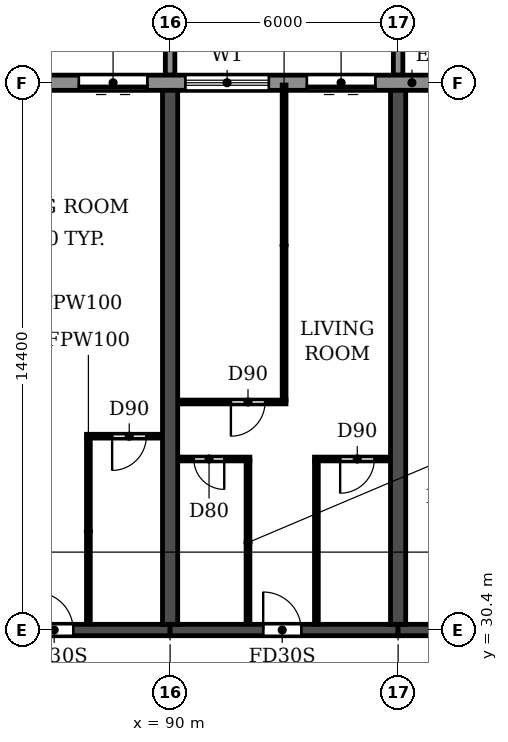
"""IFC4 building model, lengths in metres.
Left out: names, types, materials, properties, quantities, classifications, styles, units other than length and angle.
Written with IfcOpenShell. Run it as: python <this file> out.ifc"""

import sys

from ifc_helpers import new_model, si_unit, direction, frame, frame_2d, origin, place, context, subcontext, project, spatial, polyline, rectangle, outline, extrude, source, transform, mapped, element, fill, save


model = new_model("IFC4")
c1 = context("Model", 3, precision=1e-05, world=origin(), true_north=direction((0.0, 1.0)))
c2 = subcontext(c1, "Body", "Model", "MODEL_VIEW")
j1 = project(units=[si_unit("LENGTHUNIT", "METRE"), si_unit("PLANEANGLEUNIT", "RADIAN")], contexts=[c1])
p1 = place(None, origin())
s1 = spatial("IfcSite", under=j1, at=p1, CompositionType="ELEMENT")
p2 = place(p1, origin())
s2 = spatial("IfcBuilding", under=s1, at=p2, CompositionType="ELEMENT")
p3 = place(p2, frame((0.0, 0.0, 49.8)))
s3 = spatial("IfcBuildingStorey", under=s2, at=p3, CompositionType="ELEMENT", Elevation=49.8)
for number, where, z_axis, x_axis in (
    (1, (90.0, 30.55, 0.0), (0.0, 0.0, 1.0), (0.0, 1.0, 0.0)),
    (2, (96.0, 30.55, 0.0), (0.0, 0.0, 1.0), (0.0, 1.0, 0.0)),
):
    element("IfcWall", number, at=place(p3, frame(where, z_axis=z_axis, x_axis=x_axis)), inside=s3, PredefinedType="SHEAR", context=c2, shape_type="SweptSolid", body=[
        extrude(rectangle(XDim=14.05, YDim=0.4, at=frame_2d((7.025, 0.0))), origin(), (0.0, 0.0, 1.0), 3.0),
    ])
p4 = place(p3, frame((84.0, 30.4, 0.0), z_axis=(0.0, 0.0, 1.0), x_axis=(1.0, 0.0, 0.0)))
e3 = element("IfcWall", 3, at=p4, inside=s3, PredefinedType="SHEAR", context=c2, shape_type="SweptSolid", body=[
    extrude(rectangle(XDim=6.0, YDim=0.3, at=frame_2d((3.0, 0.0))), origin(), (0.0, 0.0, 1.0), 2.4),
])
p5 = place(p4, frame((2.45, 0.0, 0.0)))
e4 = element("IfcOpeningElement", 4, at=p5, cuts=e3, PredefinedType="OPENING", context=c2, shape_type="SweptSolid", body=[
    extrude(rectangle(XDim=1.0, YDim=2.1, at=frame_2d((0.5, 1.05))), frame((0.0, 0.16, 0.0), z_axis=(0.0, -1.0, 0.0), x_axis=(1.0, 0.0, 0.0)), (0.0, 0.0, 1.0), 0.32),
])
p6 = place(p3, frame((90.0, 30.4, 0.0), z_axis=(0.0, 0.0, 1.0), x_axis=(1.0, 0.0, 0.0)))
e5 = element("IfcWall", 5, at=p6, inside=s3, PredefinedType="SHEAR", context=c2, shape_type="SweptSolid", body=[
    extrude(rectangle(XDim=6.0, YDim=0.3, at=frame_2d((3.0, 0.0))), origin(), (0.0, 0.0, 1.0), 2.4),
])
p7 = place(p6, frame((2.45, 0.0, 0.0)))
e6 = element("IfcOpeningElement", 6, at=p7, cuts=e5, PredefinedType="OPENING", context=c2, shape_type="SweptSolid", body=[
    extrude(rectangle(XDim=1.0, YDim=2.1, at=frame_2d((0.5, 1.05))), frame((0.0, 0.16, 0.0), z_axis=(0.0, -1.0, 0.0), x_axis=(1.0, 0.0, 0.0)), (0.0, 0.0, 1.0), 0.32),
])
p8 = place(p3, frame((96.0, 30.4, 0.0), z_axis=(0.0, 0.0, 1.0), x_axis=(1.0, 0.0, 0.0)))
e7 = element("IfcWall", 7, at=p8, inside=s3, PredefinedType="SHEAR", context=c2, shape_type="SweptSolid", body=[
    extrude(rectangle(XDim=5.8, YDim=0.3, at=frame_2d((2.9, 0.0))), origin(), (0.0, 0.0, 1.0), 2.4),
])
p9 = place(p8, frame((2.5, 0.0, 0.0)))
e8 = element("IfcOpeningElement", 8, at=p9, cuts=e7, PredefinedType="OPENING", context=c2, shape_type="SweptSolid", body=[
    extrude(rectangle(XDim=1.0, YDim=2.1, at=frame_2d((0.5, 1.05))), frame((0.0, 0.16, 0.0), z_axis=(0.0, -1.0, 0.0), x_axis=(1.0, 0.0, 0.0)), (0.0, 0.0, 1.0), 0.32),
])
p10 = place(p3, frame((97.317, 44.8, 0.0), z_axis=(0.0, 0.0, 1.0), x_axis=(-1.0, 0.0, 0.0)))
e9 = element("IfcWall", 9, at=p10, inside=s3, PredefinedType="STANDARD", context=c2, shape_type="SweptSolid", body=[
    extrude(rectangle(XDim=92.634, YDim=0.4, at=frame_2d((46.317, 0.0))), origin(), (0.0, 0.0, 1.0), 3.0),
])
p11 = place(p10, frame((88.917, 0.0, 0.0)))
e10 = element("IfcOpeningElement", 10, at=p11, cuts=e9, PredefinedType="OPENING", context=c2, shape_type="SweptSolid", body=[
    extrude(rectangle(XDim=1.8, YDim=2.4, at=frame_2d((0.9, 1.2))), frame((0.0, 0.21, 0.0), z_axis=(0.0, -1.0, 0.0), x_axis=(1.0, 0.0, 0.0)), (0.0, 0.0, 1.0), 0.42),
])
p12 = place(p10, frame((85.717, 0.0, 0.9)))
e11 = element("IfcOpeningElement", 11, at=p12, cuts=e9, PredefinedType="OPENING", context=c2, shape_type="SweptSolid", body=[
    extrude(rectangle(XDim=2.2, YDim=1.5, at=frame_2d((1.1, 0.75))), frame((0.0, 0.21, 0.0), z_axis=(0.0, -1.0, 0.0), x_axis=(1.0, 0.0, 0.0)), (0.0, 0.0, 1.0), 0.42),
])
p13 = place(p10, frame((82.717, 0.0, 0.9)))
e12 = element("IfcOpeningElement", 12, at=p13, cuts=e9, PredefinedType="OPENING", context=c2, shape_type="SweptSolid", body=[
    extrude(rectangle(XDim=2.2, YDim=1.5, at=frame_2d((1.1, 0.75))), frame((0.0, 0.21, 0.0), z_axis=(0.0, -1.0, 0.0), x_axis=(1.0, 0.0, 0.0)), (0.0, 0.0, 1.0), 0.42),
])
p14 = place(p10, frame((79.717, 0.0, 0.9)))
e13 = element("IfcOpeningElement", 13, at=p14, cuts=e9, PredefinedType="OPENING", context=c2, shape_type="SweptSolid", body=[
    extrude(rectangle(XDim=2.2, YDim=1.5, at=frame_2d((1.1, 0.75))), frame((0.0, 0.21, 0.0), z_axis=(0.0, -1.0, 0.0), x_axis=(1.0, 0.0, 0.0)), (0.0, 0.0, 1.0), 0.42),
])
p15 = place(p10, frame((76.717, 0.0, 0.9)))
e14 = element("IfcOpeningElement", 14, at=p15, cuts=e9, PredefinedType="OPENING", context=c2, shape_type="SweptSolid", body=[
    extrude(rectangle(XDim=2.2, YDim=1.5, at=frame_2d((1.1, 0.75))), frame((0.0, 0.21, 0.0), z_axis=(0.0, -1.0, 0.0), x_axis=(1.0, 0.0, 0.0)), (0.0, 0.0, 1.0), 0.42),
])
p16 = place(p10, frame((73.917, 0.0, 0.0)))
e15 = element("IfcOpeningElement", 15, at=p16, cuts=e9, PredefinedType="OPENING", context=c2, shape_type="SweptSolid", body=[
    extrude(rectangle(XDim=1.8, YDim=2.4, at=frame_2d((0.9, 1.2))), frame((0.0, 0.21, 0.0), z_axis=(0.0, -1.0, 0.0), x_axis=(1.0, 0.0, 0.0)), (0.0, 0.0, 1.0), 0.42),
])
p17 = place(p10, frame((70.717, 0.0, 0.9)))
e16 = element("IfcOpeningElement", 16, at=p17, cuts=e9, PredefinedType="OPENING", context=c2, shape_type="SweptSolid", body=[
    extrude(rectangle(XDim=2.2, YDim=1.5, at=frame_2d((1.1, 0.75))), frame((0.0, 0.21, 0.0), z_axis=(0.0, -1.0, 0.0), x_axis=(1.0, 0.0, 0.0)), (0.0, 0.0, 1.0), 0.42),
])
p18 = place(p10, frame((67.717, 0.0, 0.9)))
e17 = element("IfcOpeningElement", 17, at=p18, cuts=e9, PredefinedType="OPENING", context=c2, shape_type="SweptSolid", body=[
    extrude(rectangle(XDim=2.2, YDim=1.5, at=frame_2d((1.1, 0.75))), frame((0.0, 0.21, 0.0), z_axis=(0.0, -1.0, 0.0), x_axis=(1.0, 0.0, 0.0)), (0.0, 0.0, 1.0), 0.42),
])
p19 = place(p10, frame((64.717, 0.0, 0.9)))
e18 = element("IfcOpeningElement", 18, at=p19, cuts=e9, PredefinedType="OPENING", context=c2, shape_type="SweptSolid", body=[
    extrude(rectangle(XDim=2.2, YDim=1.5, at=frame_2d((1.1, 0.75))), frame((0.0, 0.21, 0.0), z_axis=(0.0, -1.0, 0.0), x_axis=(1.0, 0.0, 0.0)), (0.0, 0.0, 1.0), 0.42),
])
p20 = place(p10, frame((61.917, 0.0, 0.0)))
e19 = element("IfcOpeningElement", 19, at=p20, cuts=e9, PredefinedType="OPENING", context=c2, shape_type="SweptSolid", body=[
    extrude(rectangle(XDim=1.8, YDim=2.4, at=frame_2d((0.9, 1.2))), frame((0.0, 0.21, 0.0), z_axis=(0.0, -1.0, 0.0), x_axis=(1.0, 0.0, 0.0)), (0.0, 0.0, 1.0), 0.42),
])
p21 = place(p10, frame((58.717, 0.0, 0.9)))
e20 = element("IfcOpeningElement", 20, at=p21, cuts=e9, PredefinedType="OPENING", context=c2, shape_type="SweptSolid", body=[
    extrude(rectangle(XDim=2.2, YDim=1.5, at=frame_2d((1.1, 0.75))), frame((0.0, 0.21, 0.0), z_axis=(0.0, -1.0, 0.0), x_axis=(1.0, 0.0, 0.0)), (0.0, 0.0, 1.0), 0.42),
])
p22 = place(p10, frame((55.717, 0.0, 0.9)))
e21 = element("IfcOpeningElement", 21, at=p22, cuts=e9, PredefinedType="OPENING", context=c2, shape_type="SweptSolid", body=[
    extrude(rectangle(XDim=2.2, YDim=1.5, at=frame_2d((1.1, 0.75))), frame((0.0, 0.21, 0.0), z_axis=(0.0, -1.0, 0.0), x_axis=(1.0, 0.0, 0.0)), (0.0, 0.0, 1.0), 0.42),
])
p23 = place(p10, frame((52.717, 0.0, 0.9)))
e22 = element("IfcOpeningElement", 22, at=p23, cuts=e9, PredefinedType="OPENING", context=c2, shape_type="SweptSolid", body=[
    extrude(rectangle(XDim=2.2, YDim=1.5, at=frame_2d((1.1, 0.75))), frame((0.0, 0.21, 0.0), z_axis=(0.0, -1.0, 0.0), x_axis=(1.0, 0.0, 0.0)), (0.0, 0.0, 1.0), 0.42),
])
p24 = place(p10, frame((49.917, 0.0, 0.0)))
e23 = element("IfcOpeningElement", 23, at=p24, cuts=e9, PredefinedType="OPENING", context=c2, shape_type="SweptSolid", body=[
    extrude(rectangle(XDim=1.8, YDim=2.4, at=frame_2d((0.9, 1.2))), frame((0.0, 0.21, 0.0), z_axis=(0.0, -1.0, 0.0), x_axis=(1.0, 0.0, 0.0)), (0.0, 0.0, 1.0), 0.42),
])
p25 = place(p10, frame((46.717, 0.0, 0.9)))
e24 = element("IfcOpeningElement", 24, at=p25, cuts=e9, PredefinedType="OPENING", context=c2, shape_type="SweptSolid", body=[
    extrude(rectangle(XDim=2.2, YDim=1.5, at=frame_2d((1.1, 0.75))), frame((0.0, 0.21, 0.0), z_axis=(0.0, -1.0, 0.0), x_axis=(1.0, 0.0, 0.0)), (0.0, 0.0, 1.0), 0.42),
])
p26 = place(p10, frame((43.717, 0.0, 0.9)))
e25 = element("IfcOpeningElement", 25, at=p26, cuts=e9, PredefinedType="OPENING", context=c2, shape_type="SweptSolid", body=[
    extrude(rectangle(XDim=2.2, YDim=1.5, at=frame_2d((1.1, 0.75))), frame((0.0, 0.21, 0.0), z_axis=(0.0, -1.0, 0.0), x_axis=(1.0, 0.0, 0.0)), (0.0, 0.0, 1.0), 0.42),
])
p27 = place(p10, frame((40.717, 0.0, 0.9)))
e26 = element("IfcOpeningElement", 26, at=p27, cuts=e9, PredefinedType="OPENING", context=c2, shape_type="SweptSolid", body=[
    extrude(rectangle(XDim=2.2, YDim=1.5, at=frame_2d((1.1, 0.75))), frame((0.0, 0.21, 0.0), z_axis=(0.0, -1.0, 0.0), x_axis=(1.0, 0.0, 0.0)), (0.0, 0.0, 1.0), 0.42),
])
p28 = place(p10, frame((37.917, 0.0, 0.0)))
e27 = element("IfcOpeningElement", 27, at=p28, cuts=e9, PredefinedType="OPENING", context=c2, shape_type="SweptSolid", body=[
    extrude(rectangle(XDim=1.8, YDim=2.4, at=frame_2d((0.9, 1.2))), frame((0.0, 0.21, 0.0), z_axis=(0.0, -1.0, 0.0), x_axis=(1.0, 0.0, 0.0)), (0.0, 0.0, 1.0), 0.42),
])
p29 = place(p10, frame((34.717, 0.0, 0.9)))
e28 = element("IfcOpeningElement", 28, at=p29, cuts=e9, PredefinedType="OPENING", context=c2, shape_type="SweptSolid", body=[
    extrude(rectangle(XDim=2.2, YDim=1.5, at=frame_2d((1.1, 0.75))), frame((0.0, 0.21, 0.0), z_axis=(0.0, -1.0, 0.0), x_axis=(1.0, 0.0, 0.0)), (0.0, 0.0, 1.0), 0.42),
])
p30 = place(p10, frame((31.717, 0.0, 0.9)))
e29 = element("IfcOpeningElement", 29, at=p30, cuts=e9, PredefinedType="OPENING", context=c2, shape_type="SweptSolid", body=[
    extrude(rectangle(XDim=2.2, YDim=1.5, at=frame_2d((1.1, 0.75))), frame((0.0, 0.21, 0.0), z_axis=(0.0, -1.0, 0.0), x_axis=(1.0, 0.0, 0.0)), (0.0, 0.0, 1.0), 0.42),
])
p31 = place(p10, frame((28.717, 0.0, 0.9)))
e30 = element("IfcOpeningElement", 30, at=p31, cuts=e9, PredefinedType="OPENING", context=c2, shape_type="SweptSolid", body=[
    extrude(rectangle(XDim=2.2, YDim=1.5, at=frame_2d((1.1, 0.75))), frame((0.0, 0.21, 0.0), z_axis=(0.0, -1.0, 0.0), x_axis=(1.0, 0.0, 0.0)), (0.0, 0.0, 1.0), 0.42),
])
p32 = place(p10, frame((25.917, 0.0, 0.0)))
e31 = element("IfcOpeningElement", 31, at=p32, cuts=e9, PredefinedType="OPENING", context=c2, shape_type="SweptSolid", body=[
    extrude(rectangle(XDim=1.8, YDim=2.4, at=frame_2d((0.9, 1.2))), frame((0.0, 0.21, 0.0), z_axis=(0.0, -1.0, 0.0), x_axis=(1.0, 0.0, 0.0)), (0.0, 0.0, 1.0), 0.42),
])
p33 = place(p10, frame((22.917, 0.0, 0.0)))
e32 = element("IfcOpeningElement", 32, at=p33, cuts=e9, PredefinedType="OPENING", context=c2, shape_type="SweptSolid", body=[
    extrude(rectangle(XDim=1.8, YDim=2.4, at=frame_2d((0.9, 1.2))), frame((0.0, 0.21, 0.0), z_axis=(0.0, -1.0, 0.0), x_axis=(1.0, 0.0, 0.0)), (0.0, 0.0, 1.0), 0.42),
])
p34 = place(p10, frame((19.717, 0.0, 0.9)))
e33 = element("IfcOpeningElement", 33, at=p34, cuts=e9, PredefinedType="OPENING", context=c2, shape_type="SweptSolid", body=[
    extrude(rectangle(XDim=2.2, YDim=1.5, at=frame_2d((1.1, 0.75))), frame((0.0, 0.21, 0.0), z_axis=(0.0, -1.0, 0.0), x_axis=(1.0, 0.0, 0.0)), (0.0, 0.0, 1.0), 0.42),
])
p35 = place(p10, frame((16.717, 0.0, 0.9)))
e34 = element("IfcOpeningElement", 34, at=p35, cuts=e9, PredefinedType="OPENING", context=c2, shape_type="SweptSolid", body=[
    extrude(rectangle(XDim=2.2, YDim=1.5, at=frame_2d((1.1, 0.75))), frame((0.0, 0.21, 0.0), z_axis=(0.0, -1.0, 0.0), x_axis=(1.0, 0.0, 0.0)), (0.0, 0.0, 1.0), 0.42),
])
p36 = place(p10, frame((13.717, 0.0, 0.9)))
e35 = element("IfcOpeningElement", 35, at=p36, cuts=e9, PredefinedType="OPENING", context=c2, shape_type="SweptSolid", body=[
    extrude(rectangle(XDim=2.2, YDim=1.5, at=frame_2d((1.1, 0.75))), frame((0.0, 0.21, 0.0), z_axis=(0.0, -1.0, 0.0), x_axis=(1.0, 0.0, 0.0)), (0.0, 0.0, 1.0), 0.42),
])
p37 = place(p10, frame((10.717, 0.0, 0.9)))
e36 = element("IfcOpeningElement", 36, at=p37, cuts=e9, PredefinedType="OPENING", context=c2, shape_type="SweptSolid", body=[
    extrude(rectangle(XDim=2.2, YDim=1.5, at=frame_2d((1.1, 0.75))), frame((0.0, 0.21, 0.0), z_axis=(0.0, -1.0, 0.0), x_axis=(1.0, 0.0, 0.0)), (0.0, 0.0, 1.0), 0.42),
])
p38 = place(p10, frame((7.917, 0.0, 0.0)))
e37 = element("IfcOpeningElement", 37, at=p38, cuts=e9, PredefinedType="OPENING", context=c2, shape_type="SweptSolid", body=[
    extrude(rectangle(XDim=1.8, YDim=2.4, at=frame_2d((0.9, 1.2))), frame((0.0, 0.21, 0.0), z_axis=(0.0, -1.0, 0.0), x_axis=(1.0, 0.0, 0.0)), (0.0, 0.0, 1.0), 0.42),
])
p39 = place(p10, frame((4.717, 0.0, 0.9)))
e38 = element("IfcOpeningElement", 38, at=p39, cuts=e9, PredefinedType="OPENING", context=c2, shape_type="SweptSolid", body=[
    extrude(rectangle(XDim=2.2, YDim=1.5, at=frame_2d((1.1, 0.75))), frame((0.0, 0.21, 0.0), z_axis=(0.0, -1.0, 0.0), x_axis=(1.0, 0.0, 0.0)), (0.0, 0.0, 1.0), 0.42),
])
p40 = place(p10, frame((1.917, 0.0, 0.0)))
e39 = element("IfcOpeningElement", 39, at=p40, cuts=e9, PredefinedType="OPENING", context=c2, shape_type="SweptSolid", body=[
    extrude(rectangle(XDim=1.8, YDim=2.4, at=frame_2d((0.9, 1.2))), frame((0.0, 0.21, 0.0), z_axis=(0.0, -1.0, 0.0), x_axis=(1.0, 0.0, 0.0)), (0.0, 0.0, 1.0), 0.42),
])
m1 = source(origin(), c2, "Body", "SweptSolid", [
    extrude(outline(polyline([(0.0, 0.0), (0.25, 0.0), (0.25, 3.1), (0.0, 3.1), (0.0, 0.0)])), origin(), (0.0, 0.0, 1.0), 3.1),
])
for number, where in (
    (40, (89.875, 45.0, 0.0)),
    (41, (95.875, 45.0, 0.0)),
):
    element("IfcWall", number, at=place(p3, frame(where)), inside=s3, PredefinedType="STANDARD", context=c2, shape_type="MappedRepresentation", body=[
        mapped(m1, transform((0.0, 0.0, 0.0))),
    ])
p41 = place(p3, frame((90.21, 34.9, 0.0), z_axis=(0.0, 0.0, 1.0), x_axis=(1.0, 0.0, 0.0)))
e42 = element("IfcWall", 42, at=p41, inside=s3, PredefinedType="PARTITIONING", context=c2, shape_type="SweptSolid", body=[
    extrude(rectangle(XDim=1.89, YDim=0.1, at=frame_2d((0.945, 0.0))), origin(), (0.0, 0.0, 1.0), 3.0),
])
p42 = place(p41, frame((0.415, 0.0, 0.0)))
e43 = element("IfcOpeningElement", 43, at=p42, cuts=e42, PredefinedType="OPENING", context=c2, shape_type="SweptSolid", body=[
    extrude(rectangle(XDim=0.8, YDim=2.1, at=frame_2d((0.4, 1.05))), frame((0.0, 0.06, 0.0), z_axis=(0.0, -1.0, 0.0), x_axis=(1.0, 0.0, 0.0)), (0.0, 0.0, 1.0), 0.12),
])
p43 = place(p3, frame((93.8, 34.9, 0.0), z_axis=(0.0, 0.0, 1.0), x_axis=(1.0, 0.0, 0.0)))
e44 = element("IfcWall", 44, at=p43, inside=s3, PredefinedType="PARTITIONING", context=c2, shape_type="SweptSolid", body=[
    extrude(rectangle(XDim=1.99, YDim=0.1, at=frame_2d((0.995, 0.0))), origin(), (0.0, 0.0, 1.0), 3.0),
])
p44 = place(p43, frame((0.675, 0.0, 0.0)))
e45 = element("IfcOpeningElement", 45, at=p44, cuts=e44, PredefinedType="OPENING", context=c2, shape_type="SweptSolid", body=[
    extrude(rectangle(XDim=0.9, YDim=2.1, at=frame_2d((0.45, 1.05))), frame((0.0, 0.06, 0.0), z_axis=(0.0, -1.0, 0.0), x_axis=(1.0, 0.0, 0.0)), (0.0, 0.0, 1.0), 0.12),
])
p45 = place(p3, frame((87.8, 35.5, 0.0), z_axis=(0.0, 0.0, 1.0), x_axis=(1.0, 0.0, 0.0)))
e46 = element("IfcWall", 46, at=p45, inside=s3, PredefinedType="PARTITIONING", context=c2, shape_type="SweptSolid", body=[
    extrude(rectangle(XDim=1.99, YDim=0.1, at=frame_2d((0.995, 0.0))), origin(), (0.0, 0.0, 1.0), 3.0),
])
p46 = place(p45, frame((0.675, 0.0, 0.0)))
e47 = element("IfcOpeningElement", 47, at=p46, cuts=e46, PredefinedType="OPENING", context=c2, shape_type="SweptSolid", body=[
    extrude(rectangle(XDim=0.9, YDim=2.1, at=frame_2d((0.45, 1.05))), frame((0.0, 0.06, 0.0), z_axis=(0.0, -1.0, 0.0), x_axis=(1.0, 0.0, 0.0)), (0.0, 0.0, 1.0), 0.12),
])
p47 = place(p3, frame((90.21, 36.4, 0.0), z_axis=(0.0, 0.0, 1.0), x_axis=(1.0, 0.0, 0.0)))
e48 = element("IfcWall", 48, at=p47, inside=s3, PredefinedType="PARTITIONING", context=c2, shape_type="SweptSolid", body=[
    extrude(rectangle(XDim=2.84, YDim=0.1, at=frame_2d((1.42, 0.0))), origin(), (0.0, 0.0, 1.0), 3.0),
])
p48 = place(p47, frame((1.39, 0.0, 0.0)))
e49 = element("IfcOpeningElement", 49, at=p48, cuts=e48, PredefinedType="OPENING", context=c2, shape_type="SweptSolid", body=[
    extrude(rectangle(XDim=0.9, YDim=2.1, at=frame_2d((0.45, 1.05))), frame((0.0, 0.06, 0.0), z_axis=(0.0, -1.0, 0.0), x_axis=(1.0, 0.0, 0.0)), (0.0, 0.0, 1.0), 0.12),
])
p49 = place(p3, frame((87.85, 30.56, 0.0), z_axis=(0.0, 0.0, 1.0), x_axis=(0.0, 1.0, 0.0)))
e50 = element("IfcWall", 50, at=p49, inside=s3, PredefinedType="PARTITIONING", context=c2, shape_type="SweptSolid", body=[
    extrude(rectangle(XDim=4.89, YDim=0.1, at=frame_2d((2.445, 0.0))), origin(), (0.0, 0.0, 1.0), 3.0),
])
p50 = place(p3, frame((92.05, 30.56, 0.0), z_axis=(0.0, 0.0, 1.0), x_axis=(0.0, 1.0, 0.0)))
e51 = element("IfcWall", 51, at=p50, inside=s3, PredefinedType="PARTITIONING", context=c2, shape_type="SweptSolid", body=[
    extrude(rectangle(XDim=4.29, YDim=0.1, at=frame_2d((2.145, 0.0))), origin(), (0.0, 0.0, 1.0), 3.0),
])
p51 = place(p3, frame((93.0, 36.45, 0.0), z_axis=(0.0, 0.0, 1.0), x_axis=(0.0, 1.0, 0.0)))
e52 = element("IfcWall", 52, at=p51, inside=s3, PredefinedType="PARTITIONING", context=c2, shape_type="SweptSolid", body=[
    extrude(rectangle(XDim=8.29, YDim=0.1, at=frame_2d((4.145, 0.0))), origin(), (0.0, 0.0, 1.0), 3.0),
])
p52 = place(p3, frame((93.85, 30.56, 0.0), z_axis=(0.0, 0.0, 1.0), x_axis=(0.0, 1.0, 0.0)))
e53 = element("IfcWall", 53, at=p52, inside=s3, PredefinedType="PARTITIONING", context=c2, shape_type="SweptSolid", body=[
    extrude(rectangle(XDim=4.29, YDim=0.1, at=frame_2d((2.145, 0.0))), origin(), (0.0, 0.0, 1.0), 3.0),
])
p53 = place(p38, origin())
e54 = element("IfcDoor", 54, at=p53, inside=s3, OperationType="DOUBLE_DOOR_SLIDING", PredefinedType="DOOR", context=c2, shape_type="SweptSolid", body=[
    extrude(rectangle(XDim=1.8, YDim=2.4, at=frame_2d((0.9, 1.2))), frame((0.0, 0.025, 0.0), z_axis=(0.0, -1.0, 0.0), x_axis=(1.0, 0.0, 0.0)), (0.0, 0.0, 1.0), 0.05),
])
fill(e37, e54)
p54 = place(p39, origin())
e55 = element("IfcWindow", 55, at=p54, inside=s3, PartitioningType="DOUBLE_PANEL_HORIZONTAL", PredefinedType="WINDOW", context=c2, shape_type="SweptSolid", body=[
    extrude(rectangle(XDim=2.2, YDim=1.5, at=frame_2d((1.1, 0.75))), frame((0.0, 0.03, 0.0), z_axis=(0.0, -1.0, 0.0), x_axis=(1.0, 0.0, 0.0)), (0.0, 0.0, 1.0), 0.06),
])
fill(e38, e55)
p55 = place(p40, origin())
e56 = element("IfcDoor", 56, at=p55, inside=s3, OperationType="DOUBLE_DOOR_SLIDING", PredefinedType="DOOR", context=c2, shape_type="SweptSolid", body=[
    extrude(rectangle(XDim=1.8, YDim=2.4, at=frame_2d((0.9, 1.2))), frame((0.0, 0.025, 0.0), z_axis=(0.0, -1.0, 0.0), x_axis=(1.0, 0.0, 0.0)), (0.0, 0.0, 1.0), 0.05),
])
fill(e39, e56)
p56 = place(p5, origin())
e57 = element("IfcDoor", 57, at=p56, inside=s3, OperationType="SINGLE_SWING_LEFT", PredefinedType="DOOR", context=c2, shape_type="SweptSolid", body=[
    extrude(rectangle(XDim=1.0, YDim=2.1, at=frame_2d((0.5, 1.05))), frame((0.0, 0.025, 0.0), z_axis=(0.0, -1.0, 0.0), x_axis=(1.0, 0.0, 0.0)), (0.0, 0.0, 1.0), 0.05),
])
fill(e4, e57)
p57 = place(p46, frame((0.9, 0.0, 0.0), z_axis=(0.0, 0.0, 1.0), x_axis=(-1.0, 0.0, 0.0)))
e58 = element("IfcDoor", 58, at=p57, inside=s3, OperationType="SINGLE_SWING_RIGHT", PredefinedType="DOOR", context=c2, shape_type="SweptSolid", body=[
    extrude(rectangle(XDim=0.9, YDim=2.1, at=frame_2d((0.45, 1.05))), frame((0.0, 0.025, 0.0), z_axis=(0.0, -1.0, 0.0), x_axis=(1.0, 0.0, 0.0)), (0.0, 0.0, 1.0), 0.05),
])
fill(e47, e58)
p58 = place(p42, frame((0.8, 0.0, 0.0), z_axis=(0.0, 0.0, 1.0), x_axis=(-1.0, 0.0, 0.0)))
e59 = element("IfcDoor", 59, at=p58, inside=s3, OperationType="SINGLE_SWING_LEFT", PredefinedType="DOOR", context=c2, shape_type="SweptSolid", body=[
    extrude(rectangle(XDim=0.8, YDim=2.1, at=frame_2d((0.4, 1.05))), frame((0.0, 0.025, 0.0), z_axis=(0.0, -1.0, 0.0), x_axis=(1.0, 0.0, 0.0)), (0.0, 0.0, 1.0), 0.05),
])
fill(e43, e59)
p59 = place(p48, frame((0.9, 0.0, 0.0), z_axis=(0.0, 0.0, 1.0), x_axis=(-1.0, 0.0, 0.0)))
e60 = element("IfcDoor", 60, at=p59, inside=s3, OperationType="SINGLE_SWING_RIGHT", PredefinedType="DOOR", context=c2, shape_type="SweptSolid", body=[
    extrude(rectangle(XDim=0.9, YDim=2.1, at=frame_2d((0.45, 1.05))), frame((0.0, 0.025, 0.0), z_axis=(0.0, -1.0, 0.0), x_axis=(1.0, 0.0, 0.0)), (0.0, 0.0, 1.0), 0.05),
])
fill(e49, e60)
p60 = place(p7, origin())
e61 = element("IfcDoor", 61, at=p60, inside=s3, OperationType="SINGLE_SWING_LEFT", PredefinedType="DOOR", context=c2, shape_type="SweptSolid", body=[
    extrude(rectangle(XDim=1.0, YDim=2.1, at=frame_2d((0.5, 1.05))), frame((0.0, 0.025, 0.0), z_axis=(0.0, -1.0, 0.0), x_axis=(1.0, 0.0, 0.0)), (0.0, 0.0, 1.0), 0.05),
])
fill(e6, e61)
p61 = place(p44, frame((0.9, 0.0, 0.0), z_axis=(0.0, 0.0, 1.0), x_axis=(-1.0, 0.0, 0.0)))
e62 = element("IfcDoor", 62, at=p61, inside=s3, OperationType="SINGLE_SWING_RIGHT", PredefinedType="DOOR", context=c2, shape_type="SweptSolid", body=[
    extrude(rectangle(XDim=0.9, YDim=2.1, at=frame_2d((0.45, 1.05))), frame((0.0, 0.025, 0.0), z_axis=(0.0, -1.0, 0.0), x_axis=(1.0, 0.0, 0.0)), (0.0, 0.0, 1.0), 0.05),
])
fill(e45, e62)
save(model, sys.argv[1])
